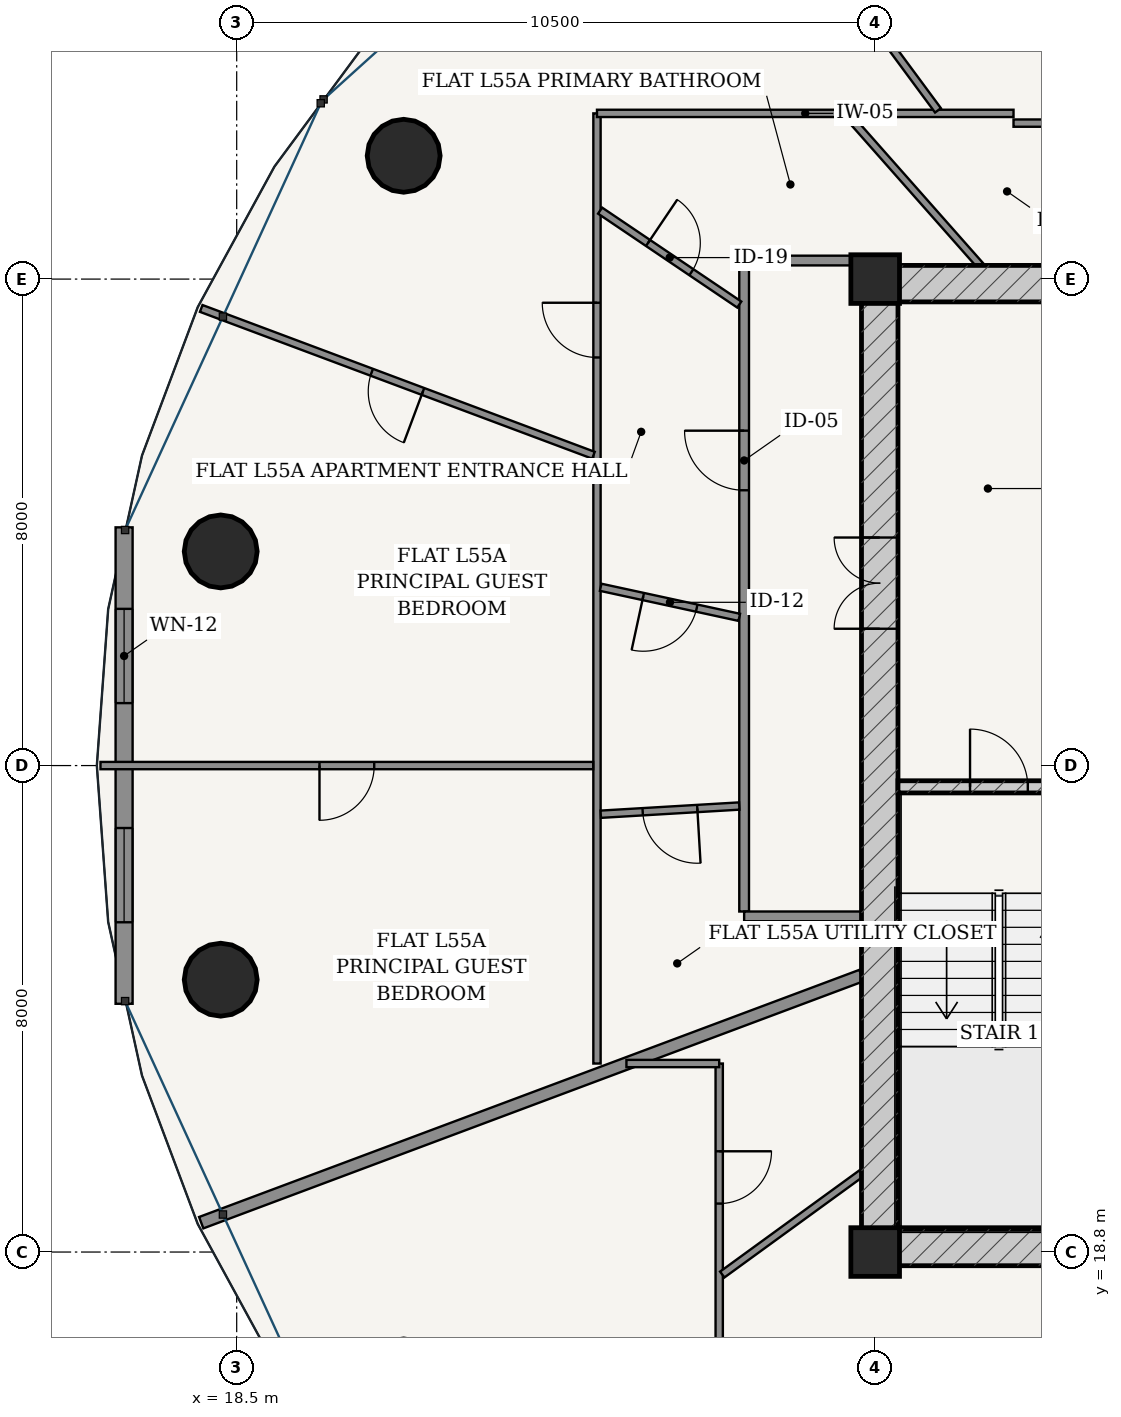
"""IFC4 building model, lengths in metres.
Left out: names, types, materials, properties, quantities, classifications, styles, units other than length and angle.
Written with IfcOpenShell. Run it as: python <this file> out.ifc"""

import sys

from ifc_helpers import new_model, si_unit, direction, frame, frame_2d, origin, origin_2d, place, context, subcontext, project, spatial, rectangle, hollow_circle, extrude, source, transform, mapped, element, fill, save


model = new_model("IFC4")
c1 = context("Model", 3, precision=1e-05, world=origin(), true_north=direction((-0.2419218956, 0.970295726276)))
c2 = subcontext(c1, "Body", "Model", "MODEL_VIEW")
j1 = project(units=[si_unit("LENGTHUNIT", "METRE"), si_unit("PLANEANGLEUNIT", "RADIAN")], contexts=[c1])
p1 = place(None, origin())
s1 = spatial("IfcSite", under=j1, at=p1, CompositionType="ELEMENT")
p2 = place(p1, origin())
s2 = spatial("IfcBuilding", under=s1, at=p2, CompositionType="ELEMENT")
p3 = place(p2, frame((0.0, 0.0, 209.7)))
s3 = spatial("IfcBuildingStorey", under=s2, at=p3, CompositionType="ELEMENT", Elevation=209.7)
for number, where, z_axis, x_axis in (
    (1, (29.0, 18.8, 0.0), (0.0, 0.0, 1.0), (1.0, 0.0, 0.0)),
    (2, (29.0, 34.8, 0.0), (0.0, 0.0, 1.0), (1.0, 0.0, 0.0)),
):
    element("IfcColumn", number, at=place(p3, frame(where, z_axis=z_axis, x_axis=x_axis)), inside=s3, PredefinedType="COLUMN", context=c2, shape_type="SweptSolid", body=[
        extrude(rectangle(XDim=0.8, YDim=0.8, at=origin_2d()), origin(), (0.0, 0.0, 1.0), 3.7),
    ])
p4 = place(p3, frame((28.775, 18.875, 0.0), z_axis=(0.0, 0.0, 1.0), x_axis=(1.0, 0.0, 0.0)))
e3 = element("IfcWall", 3, at=p4, inside=s3, PredefinedType="SHEAR", context=c2, shape_type="SweptSolid", body=[
    extrude(rectangle(XDim=18.45, YDim=0.6, at=frame_2d((9.225, 0.0))), origin(), (0.0, 0.0, 1.0), 3.435),
])
p5 = place(p4, frame((6.76, 0.0, 0.0)))
e4 = element("IfcOpeningElement", 4, at=p5, cuts=e3, PredefinedType="OPENING", context=c2, shape_type="SweptSolid", body=[
    extrude(rectangle(XDim=0.85, YDim=2.1, at=frame_2d((0.425, 1.05))), frame((0.0, 0.31, 0.0), z_axis=(0.0, -1.0, 0.0), x_axis=(1.0, 0.0, 0.0)), (0.0, 0.0, 1.0), 0.62),
])
p6 = place(p4, frame((8.8, 0.0, 0.0)))
e5 = element("IfcOpeningElement", 5, at=p6, cuts=e3, PredefinedType="OPENING", context=c2, shape_type="SweptSolid", body=[
    extrude(rectangle(XDim=0.85, YDim=2.1, at=frame_2d((0.425, 1.05))), frame((0.0, 0.31, 0.0), z_axis=(0.0, -1.0, 0.0), x_axis=(1.0, 0.0, 0.0)), (0.0, 0.0, 1.0), 0.62),
])
p7 = place(p4, frame((10.84, 0.0, 0.0)))
e6 = element("IfcOpeningElement", 6, at=p7, cuts=e3, PredefinedType="OPENING", context=c2, shape_type="SweptSolid", body=[
    extrude(rectangle(XDim=0.85, YDim=2.1, at=frame_2d((0.425, 1.05))), frame((0.0, 0.31, 0.0), z_axis=(0.0, -1.0, 0.0), x_axis=(1.0, 0.0, 0.0)), (0.0, 0.0, 1.0), 0.62),
])
p8 = place(p3, frame((28.775, 34.725, 0.0), z_axis=(0.0, 0.0, 1.0), x_axis=(1.0, 0.0, 0.0)))
e7 = element("IfcWall", 7, at=p8, inside=s3, PredefinedType="SHEAR", context=c2, shape_type="SweptSolid", body=[
    extrude(rectangle(XDim=18.45, YDim=0.6, at=frame_2d((9.225, 0.0))), origin(), (0.0, 0.0, 1.0), 3.435),
])
p9 = place(p3, frame((29.075, 19.175, 0.0), z_axis=(0.0, 0.0, 1.0), x_axis=(0.0, 1.0, 0.0)))
e8 = element("IfcWall", 8, at=p9, inside=s3, PredefinedType="SHEAR", context=c2, shape_type="SweptSolid", body=[
    extrude(rectangle(XDim=15.25, YDim=0.6, at=frame_2d((7.625, 0.0))), origin(), (0.0, 0.0, 1.0), 3.435),
])
p10 = place(p9, frame((9.875, 0.0, 0.0)))
e9 = element("IfcOpeningElement", 9, at=p10, cuts=e8, PredefinedType="OPENING", context=c2, shape_type="SweptSolid", body=[
    extrude(rectangle(XDim=1.5, YDim=2.2, at=frame_2d((0.75, 1.1))), frame((0.0, 0.31, 0.0), z_axis=(0.0, -1.0, 0.0), x_axis=(1.0, 0.0, 0.0)), (0.0, 0.0, 1.0), 0.62),
])
p11 = place(p3, frame((29.375, 26.45, 0.0), z_axis=(0.0, 0.0, 1.0), x_axis=(1.0, 0.0, 0.0)))
e10 = element("IfcWall", 10, at=p11, inside=s3, PredefinedType="SOLIDWALL", context=c2, shape_type="SweptSolid", body=[
    extrude(rectangle(XDim=3.32, YDim=0.2, at=frame_2d((1.66, 0.0))), origin(), (0.0, 0.0, 1.0), 3.435),
])
p12 = place(p11, frame((1.185, 0.0, 0.0)))
e11 = element("IfcOpeningElement", 11, at=p12, cuts=e10, PredefinedType="OPENING", context=c2, shape_type="SweptSolid", body=[
    extrude(rectangle(XDim=0.95, YDim=2.15, at=frame_2d((0.475, 1.075))), frame((0.0, 0.11, 0.0), z_axis=(0.0, -1.0, 0.0), x_axis=(1.0, 0.0, 0.0)), (0.0, 0.0, 1.0), 0.22),
])
for number, where, z_axis, x_axis in (
    (12, (21.246, 36.828, 0.0), (0.0, 0.0, 1.0), (1.0, 0.0, 0.0)),
    (13, (18.237, 30.321, 0.0), (0.0, 0.0, 1.0), (1.0, 0.0, 0.0)),
    (14, (18.237, 23.279, 0.0), (0.0, 0.0, 1.0), (1.0, 0.0, 0.0)),
):
    element("IfcColumn", number, at=place(p3, frame(where, z_axis=z_axis, x_axis=x_axis)), inside=s3, PredefinedType="COLUMN", context=c2, shape_type="SweptSolid", body=[
        extrude(hollow_circle(Radius=0.6, WallThickness=0.038, at=origin_2d()), origin(), (0.0, 0.0, 1.0), 3.7),
    ])
p13 = place(p3, frame((16.648, 30.718, 0.0), z_axis=(0.0, 0.0, 1.0), x_axis=(0.0, -1.0, 0.0)))
e15 = element("IfcWall", 15, at=p13, inside=s3, PredefinedType="SOLIDWALL", context=c2, shape_type="SweptSolid", body=[
    extrude(rectangle(XDim=7.835, YDim=0.28, at=frame_2d((3.917, 0.0))), origin(), (0.0, 0.0, 1.0), 3.435),
])
p14 = place(p13, frame((1.34, 0.0, 0.85)))
e16 = element("IfcOpeningElement", 16, at=p14, cuts=e15, PredefinedType="OPENING", context=c2, shape_type="SweptSolid", body=[
    extrude(rectangle(XDim=1.55, YDim=1.95, at=frame_2d((0.775, 0.975))), frame((0.0, 0.15, 0.0), z_axis=(0.0, -1.0, 0.0), x_axis=(1.0, 0.0, 0.0)), (0.0, 0.0, 1.0), 0.3),
])
p15 = place(p13, frame((4.944, 0.0, 0.85)))
e17 = element("IfcOpeningElement", 17, at=p15, cuts=e15, PredefinedType="OPENING", context=c2, shape_type="SweptSolid", body=[
    extrude(rectangle(XDim=1.55, YDim=1.95, at=frame_2d((0.775, 0.975))), frame((0.0, 0.15, 0.0), z_axis=(0.0, -1.0, 0.0), x_axis=(1.0, 0.0, 0.0)), (0.0, 0.0, 1.0), 0.3),
])
p16 = place(p3, frame((26.845, 24.4, 0.0), z_axis=(0.0, 0.0, 1.0), x_axis=(0.0, 1.0, 0.0)))
e18 = element("IfcWall", 18, at=p16, inside=s3, PredefinedType="PARTITIONING", context=c2, shape_type="SweptSolid", body=[
    extrude(rectangle(XDim=10.625, YDim=0.16, at=frame_2d((5.312, 0.0))), origin(), (0.0, 0.0, 1.0), 2.951),
])
p17 = place(p16, frame((6.927, 0.0, 0.0)))
e19 = element("IfcOpeningElement", 19, at=p17, cuts=e18, PredefinedType="OPENING", context=c2, shape_type="SweptSolid", body=[
    extrude(rectangle(XDim=0.98, YDim=2.2, at=frame_2d((0.49, 1.1))), frame((0.0, 0.09, 0.0), z_axis=(0.0, -1.0, 0.0), x_axis=(1.0, 0.0, 0.0)), (0.0, 0.0, 1.0), 0.18),
])
for number, where, z_axis, x_axis in (
    (20, (26.845, 35.105, 0.0), (0.0, 0.0, 1.0), (1.0, 0.0, 0.0)),
    (21, (26.845, 24.32, 0.0), (0.0, 0.0, 1.0), (1.0, 0.0, 0.0)),
):
    element("IfcWall", number, at=place(p3, frame(where, z_axis=z_axis, x_axis=x_axis)), inside=s3, PredefinedType="PARTITIONING", context=c2, shape_type="SweptSolid", body=[
        extrude(rectangle(XDim=1.93, YDim=0.16, at=frame_2d((0.965, 0.0))), origin(), (0.0, 0.0, 1.0), 3.435),
    ])
p18 = place(p3, frame((24.425, 21.9, 0.0), z_axis=(0.0, 0.0, 1.0), x_axis=(0.0, 1.0, 0.0)))
e22 = element("IfcWall", 22, at=p18, inside=s3, PredefinedType="PARTITIONING", context=c2, shape_type="SweptSolid", body=[
    extrude(rectangle(XDim=15.625, YDim=0.12, at=frame_2d((7.812, 0.0))), origin(), (0.0, 0.0, 1.0), 2.951),
])
p19 = place(p18, frame((11.611, 0.0, 0.0)))
e23 = element("IfcOpeningElement", 23, at=p19, cuts=e22, PredefinedType="OPENING", context=c2, shape_type="SweptSolid", body=[
    extrude(rectangle(XDim=0.9, YDim=2.15, at=frame_2d((0.45, 1.075))), frame((0.0, 0.07, 0.0), z_axis=(0.0, -1.0, 0.0), x_axis=(1.0, 0.0, 0.0)), (0.0, 0.0, 1.0), 0.14),
])
p20 = place(p3, frame((24.425, 37.525, 0.0), z_axis=(0.0, 0.0, 1.0), x_axis=(1.0, 0.0, 0.0)))
e24 = element("IfcWall", 24, at=p20, inside=s3, PredefinedType="PARTITIONING", context=c2, shape_type="SweptSolid", body=[
    extrude(rectangle(XDim=6.85, YDim=0.12, at=frame_2d((3.425, 0.0))), origin(), (0.0, 0.0, 1.0), 2.951),
])
p21 = place(p3, frame((31.275, 37.365, 0.0), z_axis=(0.0, 0.0, 1.0), x_axis=(1.0, 0.0, 0.0)))
e25 = element("IfcWall", 25, at=p21, inside=s3, PredefinedType="PARTITIONING", context=c2, shape_type="SweptSolid", body=[
    extrude(rectangle(XDim=6.623, YDim=0.12, at=frame_2d((3.312, 0.0))), origin(), (0.0, 0.0, 1.0), 2.951),
])
p22 = place(p21, frame((4.413, 0.0, 0.0)))
e26 = element("IfcOpeningElement", 26, at=p22, cuts=e25, PredefinedType="OPENING", context=c2, shape_type="SweptSolid", body=[
    extrude(rectangle(XDim=0.86, YDim=2.15, at=frame_2d((0.43, 1.075))), frame((0.0, 0.07, 0.0), z_axis=(0.0, -1.0, 0.0), x_axis=(1.0, 0.0, 0.0)), (0.0, 0.0, 1.0), 0.14),
])
p23 = place(p21, frame((1.328, 0.0, 0.0)))
e27 = element("IfcOpeningElement", 27, at=p23, cuts=e25, PredefinedType="OPENING", context=c2, shape_type="SweptSolid", body=[
    extrude(rectangle(XDim=0.9, YDim=2.15, at=frame_2d((0.45, 1.075))), frame((0.0, 0.07, 0.0), z_axis=(0.0, -1.0, 0.0), x_axis=(1.0, 0.0, 0.0)), (0.0, 0.0, 1.0), 0.14),
])
p24 = place(p3, frame((30.033, 37.575, 0.0), z_axis=(0.0, 0.0, 1.0), x_axis=(-0.59452500855, 0.804077119565, 0.0)))
e28 = element("IfcWall", 28, at=p24, inside=s3, PredefinedType="PARTITIONING", context=c2, shape_type="SweptSolid", body=[
    extrude(rectangle(XDim=6.867, YDim=0.12, at=frame_2d((3.434, 0.0))), origin(), (0.0, 0.0, 1.0), 2.951),
])
p25 = place(p24, frame((1.976, 0.0, 0.0)))
e29 = element("IfcOpeningElement", 29, at=p25, cuts=e28, PredefinedType="OPENING", context=c2, shape_type="SweptSolid", body=[
    extrude(rectangle(XDim=0.9, YDim=2.15, at=frame_2d((0.45, 1.075))), frame((0.0, 0.07, 0.0), z_axis=(0.0, -1.0, 0.0), x_axis=(1.0, 0.0, 0.0)), (0.0, 0.0, 1.0), 0.14),
])
p26 = place(p3, frame((24.367, 31.903, 0.0), z_axis=(0.0, 0.0, 1.0), x_axis=(-0.936544604529, 0.350548432785, 0.0)))
e30 = element("IfcWall", 30, at=p26, inside=s3, PredefinedType="PARTITIONING", context=c2, shape_type="SweptSolid", body=[
    extrude(rectangle(XDim=6.887, YDim=0.12, at=frame_2d((3.444, 0.0))), origin(), (0.0, 0.0, 1.0), 2.951),
])
p27 = place(p26, frame((2.994, 0.0, 0.0)))
e31 = element("IfcOpeningElement", 31, at=p27, cuts=e30, PredefinedType="OPENING", context=c2, shape_type="SweptSolid", body=[
    extrude(rectangle(XDim=0.9, YDim=2.15, at=frame_2d((0.45, 1.075))), frame((0.0, 0.07, 0.0), z_axis=(0.0, -1.0, 0.0), x_axis=(1.0, 0.0, 0.0)), (0.0, 0.0, 1.0), 0.14),
])
p28 = place(p3, frame((24.363, 26.8, 0.0), z_axis=(0.0, 0.0, 1.0), x_axis=(-1.0, 0.0, 0.0)))
e32 = element("IfcWall", 32, at=p28, inside=s3, PredefinedType="PARTITIONING", context=c2, shape_type="SweptSolid", body=[
    extrude(rectangle(XDim=8.103, YDim=0.12, at=frame_2d((4.052, 0.0))), origin(), (0.0, 0.0, 1.0), 2.951),
])
p29 = place(p28, frame((3.602, 0.0, 0.0)))
e33 = element("IfcOpeningElement", 33, at=p29, cuts=e32, PredefinedType="OPENING", context=c2, shape_type="SweptSolid", body=[
    extrude(rectangle(XDim=0.9, YDim=2.15, at=frame_2d((0.45, 1.075))), frame((0.0, 0.07, 0.0), z_axis=(0.0, -1.0, 0.0), x_axis=(1.0, 0.0, 0.0)), (0.0, 0.0, 1.0), 0.14),
])
p30 = place(p3, frame((30.726, 35.027, 0.0), z_axis=(0.0, 0.0, 1.0), x_axis=(-0.662398427862, 0.749151735475, 0.0)))
e34 = element("IfcWall", 34, at=p30, inside=s3, PredefinedType="PARTITIONING", context=c2, shape_type="SweptSolid", body=[
    extrude(rectangle(XDim=3.273, YDim=0.12, at=frame_2d((1.636, 0.0))), origin(), (0.0, 0.0, 1.0), 3.435),
])
p31 = place(p3, frame((26.765, 34.381, 0.0), z_axis=(0.0, 0.0, 1.0), x_axis=(-0.828908126494, 0.55938476725, 0.0)))
e35 = element("IfcWall", 35, at=p31, inside=s3, PredefinedType="PARTITIONING", context=c2, shape_type="SweptSolid", body=[
    extrude(rectangle(XDim=2.761, YDim=0.12, at=frame_2d((1.38, 0.0))), origin(), (0.0, 0.0, 1.0), 3.11),
])
p32 = place(p31, frame((0.95, 0.0, 0.0)))
e36 = element("IfcOpeningElement", 36, at=p32, cuts=e35, PredefinedType="OPENING", context=c2, shape_type="SweptSolid", body=[
    extrude(rectangle(XDim=0.86, YDim=2.15, at=frame_2d((0.43, 1.075))), frame((0.0, 0.07, 0.0), z_axis=(0.0, -1.0, 0.0), x_axis=(1.0, 0.0, 0.0)), (0.0, 0.0, 1.0), 0.14),
])
p33 = place(p3, frame((26.765, 29.238, 0.0), z_axis=(0.0, 0.0, 1.0), x_axis=(-0.977275456013, 0.211973307458, 0.0)))
e37 = element("IfcWall", 37, at=p33, inside=s3, PredefinedType="PARTITIONING", context=c2, shape_type="SweptSolid", body=[
    extrude(rectangle(XDim=2.332, YDim=0.12, at=frame_2d((1.166, 0.0))), origin(), (0.0, 0.0, 1.0), 3.435),
])
p34 = place(p33, frame((0.716, 0.0, 0.0)))
e38 = element("IfcOpeningElement", 38, at=p34, cuts=e37, PredefinedType="OPENING", context=c2, shape_type="SweptSolid", body=[
    extrude(rectangle(XDim=0.9, YDim=2.15, at=frame_2d((0.45, 1.075))), frame((0.0, 0.07, 0.0), z_axis=(0.0, -1.0, 0.0), x_axis=(1.0, 0.0, 0.0)), (0.0, 0.0, 1.0), 0.14),
])
p35 = place(p3, frame((26.765, 26.135, 0.0), z_axis=(0.0, 0.0, 1.0), x_axis=(-0.998248453424, -0.059161011118, 0.0)))
e39 = element("IfcWall", 39, at=p35, inside=s3, PredefinedType="PARTITIONING", context=c2, shape_type="SweptSolid", body=[
    extrude(rectangle(XDim=2.282, YDim=0.12, at=frame_2d((1.141, 0.0))), origin(), (0.0, 0.0, 1.0), 3.435),
])
p36 = place(p35, frame((0.691, 0.0, 0.0)))
e40 = element("IfcOpeningElement", 40, at=p36, cuts=e39, PredefinedType="OPENING", context=c2, shape_type="SweptSolid", body=[
    extrude(rectangle(XDim=0.9, YDim=2.15, at=frame_2d((0.45, 1.075))), frame((0.0, 0.07, 0.0), z_axis=(0.0, -1.0, 0.0), x_axis=(1.0, 0.0, 0.0)), (0.0, 0.0, 1.0), 0.14),
])
p37 = place(p3, frame((28.775, 23.347, 0.0), z_axis=(0.0, 0.0, 1.0), x_axis=(-0.936537569358, -0.350567227761, 0.0)))
e41 = element("IfcWall", 41, at=p37, inside=s3, PredefinedType="PARTITIONING", context=c2, shape_type="SweptSolid", body=[
    extrude(rectangle(XDim=11.594, YDim=0.2, at=frame_2d((5.797, 0.0))), origin(), (0.0, 0.0, 1.0), 2.951),
])
p38 = place(p3, frame((26.435, 16.235, 0.0), z_axis=(0.0, 0.0, 1.0), x_axis=(0.0, 1.0, 0.0)))
e42 = element("IfcWall", 42, at=p38, inside=s3, PredefinedType="PARTITIONING", context=c2, shape_type="SweptSolid", body=[
    extrude(rectangle(XDim=5.665, YDim=0.12, at=frame_2d((2.833, 0.0))), origin(), (0.0, 0.0, 1.0), 2.951),
])
p39 = place(p38, frame((3.362, 0.0, 0.0)))
e43 = element("IfcOpeningElement", 43, at=p39, cuts=e42, PredefinedType="OPENING", context=c2, shape_type="SweptSolid", body=[
    extrude(rectangle(XDim=0.86, YDim=2.15, at=frame_2d((0.43, 1.075))), frame((0.0, 0.07, 0.0), z_axis=(0.0, -1.0, 0.0), x_axis=(1.0, 0.0, 0.0)), (0.0, 0.0, 1.0), 0.14),
])
p40 = place(p3, frame((26.435, 21.9, 0.0), z_axis=(0.0, 0.0, 1.0), x_axis=(-1.0, 0.0, 0.0)))
e44 = element("IfcWall", 44, at=p40, inside=s3, PredefinedType="PARTITIONING", context=c2, shape_type="SweptSolid", body=[
    extrude(rectangle(XDim=1.526, YDim=0.12, at=frame_2d((0.763, 0.0))), origin(), (0.0, 0.0, 1.0), 3.435),
])
p41 = place(p3, frame((28.775, 20.094, 0.0), z_axis=(0.0, 0.0, 1.0), x_axis=(-0.808862864425, -0.587997335499, 0.0)))
e45 = element("IfcWall", 45, at=p41, inside=s3, PredefinedType="PARTITIONING", context=c2, shape_type="SweptSolid", body=[
    extrude(rectangle(XDim=2.831, YDim=0.12, at=frame_2d((1.416, 0.0))), origin(), (0.0, 0.0, 1.0), 3.435),
])
p42 = place(p3, frame((32.981, 18.575, 0.0), z_axis=(0.0, 0.0, 1.0), x_axis=(-0.520926540997, -0.853601510592, 0.0)))
e46 = element("IfcWall", 46, at=p42, inside=s3, PredefinedType="PARTITIONING", context=c2, shape_type="SweptSolid", body=[
    extrude(rectangle(XDim=2.679, YDim=0.12, at=frame_2d((1.34, 0.0))), origin(), (0.0, 0.0, 1.0), 3.435),
])
m1 = source(origin(), c2, "Body", "SweptSolid", [
    extrude(rectangle(XDim=1.55, YDim=1.95, at=frame_2d((0.775, 0.975))), frame((0.0, 0.03, 0.0), z_axis=(0.0, -1.0, 0.0), x_axis=(1.0, 0.0, 0.0)), (0.0, 0.0, 1.0), 0.06),
])
p43 = place(p14, origin())
e47 = element("IfcWindow", 47, at=p43, inside=s3, PartitioningType="SINGLE_PANEL", PredefinedType="WINDOW", context=c2, shape_type="MappedRepresentation", body=[
    mapped(m1, transform((0.0, 0.0, 0.0), scale=1.0)),
])
fill(e16, e47)
p44 = place(p15, origin())
e48 = element("IfcWindow", 48, at=p44, inside=s3, PartitioningType="SINGLE_PANEL", PredefinedType="WINDOW", context=c2, shape_type="MappedRepresentation", body=[
    mapped(m1, transform((0.0, 0.0, 0.0), scale=1.0)),
])
fill(e17, e48)
m2 = source(origin(), c2, "Body", "SweptSolid", [
    extrude(rectangle(XDim=1.5, YDim=2.2, at=frame_2d((0.75, 1.1))), frame((0.0, 0.025, 0.0), z_axis=(0.0, -1.0, 0.0), x_axis=(1.0, 0.0, 0.0)), (0.0, 0.0, 1.0), 0.05),
])
p45 = place(p10, origin())
e49 = element("IfcDoor", 49, at=p45, inside=s3, OperationType="DOUBLE_DOOR_SINGLE_SWING", PredefinedType="DOOR", context=c2, shape_type="MappedRepresentation", body=[
    mapped(m2, transform((0.0, 0.0, 0.0), scale=1.0)),
])
fill(e9, e49)
m3 = source(origin(), c2, "Body", "SweptSolid", [
    extrude(rectangle(XDim=0.95, YDim=2.15, at=frame_2d((0.475, 1.075))), frame((0.0, 0.025, 0.0), z_axis=(0.0, -1.0, 0.0), x_axis=(1.0, 0.0, 0.0)), (0.0, 0.0, 1.0), 0.05),
])
p46 = place(p12, origin())
e50 = element("IfcDoor", 50, at=p46, inside=s3, OperationType="SINGLE_SWING_LEFT", PredefinedType="DOOR", context=c2, shape_type="MappedRepresentation", body=[
    mapped(m3, transform((0.0, 0.0, 0.0), scale=1.0)),
])
fill(e11, e50)
m4 = source(origin(), c2, "Body", "SweptSolid", [
    extrude(rectangle(XDim=0.98, YDim=2.2, at=frame_2d((0.49, 1.1))), frame((0.0, 0.025, 0.0), z_axis=(0.0, -1.0, 0.0), x_axis=(1.0, 0.0, 0.0)), (0.0, 0.0, 1.0), 0.05),
])
p47 = place(p17, origin())
e51 = element("IfcDoor", 51, at=p47, inside=s3, OperationType="SINGLE_SWING_RIGHT", PredefinedType="DOOR", context=c2, shape_type="MappedRepresentation", body=[
    mapped(m4, transform((0.0, 0.0, 0.0), scale=1.0)),
])
fill(e19, e51)
m5 = source(origin(), c2, "Body", "SweptSolid", [
    extrude(rectangle(XDim=0.86, YDim=2.15, at=frame_2d((0.43, 1.075))), frame((0.0, 0.025, 0.0), z_axis=(0.0, -1.0, 0.0), x_axis=(1.0, 0.0, 0.0)), (0.0, 0.0, 1.0), 0.05),
])
p48 = place(p32, frame((0.86, 0.0, 0.0), z_axis=(0.0, 0.0, 1.0), x_axis=(-1.0, 0.0, 0.0)))
e52 = element("IfcDoor", 52, at=p48, inside=s3, OperationType="SINGLE_SWING_LEFT", PredefinedType="DOOR", context=c2, shape_type="MappedRepresentation", body=[
    mapped(m5, transform((0.0, 0.0, 0.0), scale=1.0)),
])
fill(e36, e52)
m6 = source(origin(), c2, "Body", "SweptSolid", [
    extrude(rectangle(XDim=0.9, YDim=2.15, at=frame_2d((0.45, 1.075))), frame((0.0, 0.025, 0.0), z_axis=(0.0, -1.0, 0.0), x_axis=(1.0, 0.0, 0.0)), (0.0, 0.0, 1.0), 0.05),
])
p49 = place(p34, origin())
e53 = element("IfcDoor", 53, at=p49, inside=s3, OperationType="SINGLE_SWING_RIGHT", PredefinedType="DOOR", context=c2, shape_type="MappedRepresentation", body=[
    mapped(m6, transform((0.0, 0.0, 0.0), scale=1.0)),
])
fill(e38, e53)
p50 = place(p36, origin())
e54 = element("IfcDoor", 54, at=p50, inside=s3, OperationType="SINGLE_SWING_LEFT", PredefinedType="DOOR", context=c2, shape_type="MappedRepresentation", body=[
    mapped(m6, transform((0.0, 0.0, 0.0), scale=1.0)),
])
fill(e40, e54)
p51 = place(p19, origin())
e55 = element("IfcDoor", 55, at=p51, inside=s3, OperationType="SINGLE_SWING_RIGHT", PredefinedType="DOOR", context=c2, shape_type="MappedRepresentation", body=[
    mapped(m6, transform((0.0, 0.0, 0.0), scale=1.0)),
])
fill(e23, e55)
p52 = place(p27, origin())
e56 = element("IfcDoor", 56, at=p52, inside=s3, OperationType="SINGLE_SWING_LEFT", PredefinedType="DOOR", context=c2, shape_type="MappedRepresentation", body=[
    mapped(m6, transform((0.0, 0.0, 0.0), scale=1.0)),
])
fill(e31, e56)
p53 = place(p29, origin())
e57 = element("IfcDoor", 57, at=p53, inside=s3, OperationType="SINGLE_SWING_RIGHT", PredefinedType="DOOR", context=c2, shape_type="MappedRepresentation", body=[
    mapped(m6, transform((0.0, 0.0, 0.0), scale=1.0)),
])
fill(e33, e57)
p54 = place(p39, frame((0.86, 0.0, 0.0), z_axis=(0.0, 0.0, 1.0), x_axis=(-1.0, 0.0, 0.0)))
e58 = element("IfcDoor", 58, at=p54, inside=s3, OperationType="SINGLE_SWING_LEFT", PredefinedType="DOOR", context=c2, shape_type="MappedRepresentation", body=[
    mapped(m5, transform((0.0, 0.0, 0.0), scale=1.0)),
])
fill(e43, e58)
save(model, sys.argv[1])
